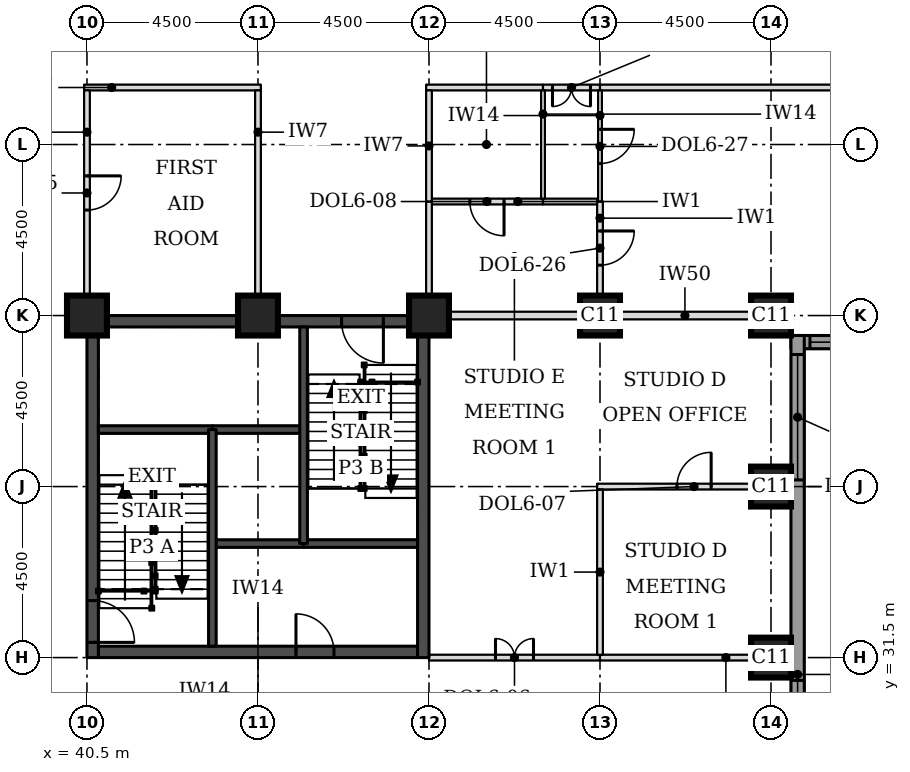
"""IFC4 building model, lengths in metres.
Left out: names, types, materials, properties, quantities, classifications, styles, units other than length and angle.
Written with IfcOpenShell. Run it as: python <this file> out.ifc"""

import sys

from ifc_helpers import new_model, si_unit, direction, frame, frame_2d, origin, origin_2d, place, context, subcontext, project, spatial, rectangle, extrude, element, fill, save


model = new_model("IFC4")
c1 = context("Model", 3, precision=1e-05, world=origin(), true_north=direction((0.0, 1.0)))
c2 = subcontext(c1, "Body", "Model", "MODEL_VIEW")
j1 = project(units=[si_unit("LENGTHUNIT", "METRE"), si_unit("PLANEANGLEUNIT", "RADIAN")], contexts=[c1])
p1 = place(None, origin())
s1 = spatial("IfcSite", under=j1, at=p1, CompositionType="ELEMENT")
p2 = place(p1, origin())
s2 = spatial("IfcBuilding", under=s1, at=p2, CompositionType="ELEMENT")
p3 = place(p2, frame((0.0, 0.0, 115.9)))
s3 = spatial("IfcBuildingStorey", under=s2, at=p3, CompositionType="ELEMENT", Elevation=115.9)
for number, where, z_axis, x_axis in (
    (1, (58.5, 31.5, 0.0), (0.0, 0.0, 1.0), (1.0, 0.0, 0.0)),
    (2, (58.5, 36.0, 0.0), (0.0, 0.0, 1.0), (1.0, 0.0, 0.0)),
    (3, (40.5, 40.5, 0.0), (0.0, 0.0, 1.0), (1.0, 0.0, 0.0)),
    (4, (45.0, 40.5, 0.0), (0.0, 0.0, 1.0), (1.0, 0.0, 0.0)),
    (5, (49.5, 40.5, 0.0), (0.0, 0.0, 1.0), (1.0, 0.0, 0.0)),
    (6, (54.0, 40.5, 0.0), (0.0, 0.0, 1.0), (1.0, 0.0, 0.0)),
    (7, (58.5, 40.5, 0.0), (0.0, 0.0, 1.0), (1.0, 0.0, 0.0)),
):
    element("IfcColumn", number, at=place(p3, frame(where, z_axis=z_axis, x_axis=x_axis)), inside=s3, PredefinedType="COLUMN", context=c2, shape_type="SweptSolid", body=[
        extrude(rectangle(XDim=1.05, YDim=1.05, at=origin_2d()), origin(), (0.0, 0.0, 1.0), 3.7),
    ])
p4 = place(p3, frame((40.8, 31.65, 0.0), z_axis=(0.0, 0.0, 1.0), x_axis=(1.0, 0.0, 0.0)))
e8 = element("IfcWall", 8, at=p4, inside=s3, PredefinedType="SHEAR", context=c2, shape_type="SweptSolid", body=[
    extrude(rectangle(XDim=8.4, YDim=0.3, at=frame_2d((4.2, 0.0))), origin(), (0.0, 0.0, 1.0), 3.7),
])
p5 = place(p4, frame((5.2, 0.0, 0.0)))
e9 = element("IfcOpeningElement", 9, at=p5, cuts=e8, PredefinedType="OPENING", context=c2, shape_type="SweptSolid", body=[
    extrude(rectangle(XDim=1.0, YDim=2.1, at=frame_2d((0.5, 1.05))), frame((0.0, 0.16, 0.0), z_axis=(0.0, -1.0, 0.0), x_axis=(1.0, 0.0, 0.0)), (0.0, 0.0, 1.0), 0.32),
])
p6 = place(p3, frame((40.8, 40.35, 0.0), z_axis=(0.0, 0.0, 1.0), x_axis=(1.0, 0.0, 0.0)))
e10 = element("IfcWall", 10, at=p6, inside=s3, PredefinedType="SHEAR", context=c2, shape_type="SweptSolid", body=[
    extrude(rectangle(XDim=8.4, YDim=0.3, at=frame_2d((4.2, 0.0))), origin(), (0.0, 0.0, 1.0), 3.7),
])
p7 = place(p6, frame((6.4, 0.0, 0.0)))
e11 = element("IfcOpeningElement", 11, at=p7, cuts=e10, PredefinedType="OPENING", context=c2, shape_type="SweptSolid", body=[
    extrude(rectangle(XDim=1.1, YDim=2.1, at=frame_2d((0.55, 1.05))), frame((0.0, 0.16, 0.0), z_axis=(0.0, -1.0, 0.0), x_axis=(1.0, 0.0, 0.0)), (0.0, 0.0, 1.0), 0.32),
])
p8 = place(p3, frame((40.65, 31.5, 0.0), z_axis=(0.0, 0.0, 1.0), x_axis=(0.0, 1.0, 0.0)))
e12 = element("IfcWall", 12, at=p8, inside=s3, PredefinedType="SHEAR", context=c2, shape_type="SweptSolid", body=[
    extrude(rectangle(XDim=9.0, YDim=0.3, at=frame_2d((4.5, 0.0))), origin(), (0.0, 0.0, 1.0), 3.7),
])
p9 = place(p8, frame((0.4, 0.0, 0.0)))
e13 = element("IfcOpeningElement", 13, at=p9, cuts=e12, PredefinedType="OPENING", context=c2, shape_type="SweptSolid", body=[
    extrude(rectangle(XDim=1.1, YDim=2.1, at=frame_2d((0.55, 1.05))), frame((0.0, 0.16, 0.0), z_axis=(0.0, -1.0, 0.0), x_axis=(1.0, 0.0, 0.0)), (0.0, 0.0, 1.0), 0.32),
])
p10 = place(p3, frame((49.35, 31.5, 0.0), z_axis=(0.0, 0.0, 1.0), x_axis=(0.0, 1.0, 0.0)))
e14 = element("IfcWall", 14, at=p10, inside=s3, PredefinedType="SHEAR", context=c2, shape_type="SweptSolid", body=[
    extrude(rectangle(XDim=9.0, YDim=0.3, at=frame_2d((4.5, 0.0))), origin(), (0.0, 0.0, 1.0), 3.7),
])
p11 = place(p3, frame((59.025, 39.8, 0.0), z_axis=(0.0, 0.0, 1.0), x_axis=(1.0, 0.0, 0.0)))
e15 = element("IfcWall", 15, at=p11, inside=s3, PredefinedType="STANDARD", context=c2, shape_type="SweptSolid", body=[
    extrude(rectangle(XDim=13.337, YDim=0.35, at=frame_2d((6.669, 0.0))), origin(), (0.0, 0.0, 1.0), 3.525),
])
p12 = place(p11, frame((0.5, 0.0, 0.9)))
e16 = element("IfcOpeningElement", 16, at=p12, cuts=e15, PredefinedType="OPENING", context=c2, shape_type="SweptSolid", body=[
    extrude(rectangle(XDim=3.3, YDim=1.9, at=frame_2d((1.65, 0.95))), frame((0.0, 0.185, 0.0), z_axis=(0.0, -1.0, 0.0), x_axis=(1.0, 0.0, 0.0)), (0.0, 0.0, 1.0), 0.37),
])
p13 = place(p3, frame((59.2, 22.138, 0.0), z_axis=(0.0, 0.0, 1.0), x_axis=(0.0, 1.0, 0.0)))
e17 = element("IfcWall", 17, at=p13, inside=s3, PredefinedType="STANDARD", context=c2, shape_type="SweptSolid", body=[
    extrude(rectangle(XDim=17.837, YDim=0.35, at=frame_2d((8.919, 0.0))), origin(), (0.0, 0.0, 1.0), 3.525),
])
p14 = place(p13, frame((5.462, 0.0, 0.9)))
e18 = element("IfcOpeningElement", 18, at=p14, cuts=e17, PredefinedType="OPENING", context=c2, shape_type="SweptSolid", body=[
    extrude(rectangle(XDim=3.3, YDim=1.9, at=frame_2d((1.65, 0.95))), frame((0.0, 0.185, 0.0), z_axis=(0.0, -1.0, 0.0), x_axis=(1.0, 0.0, 0.0)), (0.0, 0.0, 1.0), 0.37),
])
p15 = place(p13, frame((14.037, 0.0, 0.9)))
e19 = element("IfcOpeningElement", 19, at=p15, cuts=e17, PredefinedType="OPENING", context=c2, shape_type="SweptSolid", body=[
    extrude(rectangle(XDim=3.3, YDim=1.9, at=frame_2d((1.65, 0.95))), frame((0.0, 0.185, 0.0), z_axis=(0.0, -1.0, 0.0), x_axis=(1.0, 0.0, 0.0)), (0.0, 0.0, 1.0), 0.37),
])
p16 = place(p3, frame((49.5, 31.5, 0.0), z_axis=(0.0, 0.0, 1.0), x_axis=(1.0, 0.0, 0.0)))
e20 = element("IfcWall", 20, at=p16, inside=s3, PredefinedType="PARTITIONING", context=c2, shape_type="SweptSolid", body=[
    extrude(rectangle(XDim=4.5, YDim=0.15, at=frame_2d((2.25, 0.0))), origin(), (0.0, 0.0, 1.0), 2.55),
])
p17 = place(p16, frame((1.75, 0.0, 0.0)))
e21 = element("IfcOpeningElement", 21, at=p17, cuts=e20, PredefinedType="OPENING", context=c2, shape_type="SweptSolid", body=[
    extrude(rectangle(XDim=1.0, YDim=2.1, at=frame_2d((0.5, 1.05))), frame((0.0, 0.085, 0.0), z_axis=(0.0, -1.0, 0.0), x_axis=(1.0, 0.0, 0.0)), (0.0, 0.0, 1.0), 0.17),
])
p18 = place(p3, frame((54.0, 31.5, 0.0), z_axis=(0.0, 0.0, 1.0), x_axis=(1.0, 0.0, 0.0)))
e22 = element("IfcWall", 22, at=p18, inside=s3, PredefinedType="PARTITIONING", context=c2, shape_type="SweptSolid", body=[
    extrude(rectangle(XDim=5.025, YDim=0.15, at=frame_2d((2.512, 0.0))), origin(), (0.0, 0.0, 1.0), 2.55),
])
p19 = place(p3, frame((53.925, 36.0, 0.0), z_axis=(0.0, 0.0, 1.0), x_axis=(1.0, 0.0, 0.0)))
e23 = element("IfcWall", 23, at=p19, inside=s3, PredefinedType="PARTITIONING", context=c2, shape_type="SweptSolid", body=[
    extrude(rectangle(XDim=5.1, YDim=0.15, at=frame_2d((2.55, 0.0))), origin(), (0.0, 0.0, 1.0), 3.096),
])
p20 = place(p19, frame((2.1, 0.0, 0.0)))
e24 = element("IfcOpeningElement", 24, at=p20, cuts=e23, PredefinedType="OPENING", context=c2, shape_type="SweptSolid", body=[
    extrude(rectangle(XDim=0.9, YDim=2.1, at=frame_2d((0.45, 1.05))), frame((0.0, 0.085, 0.0), z_axis=(0.0, -1.0, 0.0), x_axis=(1.0, 0.0, 0.0)), (0.0, 0.0, 1.0), 0.17),
])
p21 = place(p3, frame((50.015, 40.5, 0.0), z_axis=(0.0, 0.0, 1.0), x_axis=(1.0, 0.0, 0.0)))
e25 = element("IfcWall", 25, at=p21, inside=s3, PredefinedType="PARTITIONING", context=c2, shape_type="SweptSolid", body=[
    extrude(rectangle(XDim=3.46, YDim=0.2, at=frame_2d((1.73, 0.0))), origin(), (0.0, 0.0, 1.0), 2.8),
])
p22 = place(p3, frame((54.495, 40.5, 0.0), z_axis=(0.0, 0.0, 1.0), x_axis=(1.0, 0.0, 0.0)))
e26 = element("IfcWall", 26, at=p22, inside=s3, PredefinedType="PARTITIONING", context=c2, shape_type="SweptSolid", body=[
    extrude(rectangle(XDim=3.48, YDim=0.2, at=frame_2d((1.74, 0.0))), origin(), (0.0, 0.0, 1.0), 2.8),
])
p23 = place(p3, frame((49.575, 43.5, 0.0), z_axis=(0.0, 0.0, 1.0), x_axis=(1.0, 0.0, 0.0)))
e27 = element("IfcWall", 27, at=p23, inside=s3, PredefinedType="PARTITIONING", context=c2, shape_type="SweptSolid", body=[
    extrude(rectangle(XDim=2.925, YDim=0.15, at=frame_2d((1.462, 0.0))), origin(), (0.0, 0.0, 1.0), 3.55),
])
p24 = place(p23, frame((1.0, 0.0, 0.0)))
e28 = element("IfcOpeningElement", 28, at=p24, cuts=e27, PredefinedType="OPENING", context=c2, shape_type="SweptSolid", body=[
    extrude(rectangle(XDim=0.9, YDim=2.1, at=frame_2d((0.45, 1.05))), frame((0.0, 0.085, 0.0), z_axis=(0.0, -1.0, 0.0), x_axis=(1.0, 0.0, 0.0)), (0.0, 0.0, 1.0), 0.17),
])
p25 = place(p3, frame((52.5, 43.5, 0.0), z_axis=(0.0, 0.0, 1.0), x_axis=(1.0, 0.0, 0.0)))
e29 = element("IfcWall", 29, at=p25, inside=s3, PredefinedType="PARTITIONING", context=c2, shape_type="SweptSolid", body=[
    extrude(rectangle(XDim=1.425, YDim=0.15, at=frame_2d((0.712, 0.0))), origin(), (0.0, 0.0, 1.0), 3.55),
])
p26 = place(p3, frame((40.425, 46.5, 0.0), z_axis=(0.0, 0.0, 1.0), x_axis=(1.0, 0.0, 0.0)))
e30 = element("IfcWall", 30, at=p26, inside=s3, PredefinedType="PARTITIONING", context=c2, shape_type="SweptSolid", body=[
    extrude(rectangle(XDim=4.65, YDim=0.15, at=frame_2d((2.325, 0.0))), origin(), (0.0, 0.0, 1.0), 3.55),
])
p27 = place(p3, frame((49.425, 46.5, 0.0), z_axis=(0.0, 0.0, 1.0), x_axis=(1.0, 0.0, 0.0)))
e31 = element("IfcWall", 31, at=p27, inside=s3, PredefinedType="PARTITIONING", context=c2, shape_type="SweptSolid", body=[
    extrude(rectangle(XDim=3.075, YDim=0.15, at=frame_2d((1.538, 0.0))), origin(), (0.0, 0.0, 1.0), 3.55),
])
p28 = place(p3, frame((52.5, 46.5, 0.0), z_axis=(0.0, 0.0, 1.0), x_axis=(1.0, 0.0, 0.0)))
e32 = element("IfcWall", 32, at=p28, inside=s3, PredefinedType="PARTITIONING", context=c2, shape_type="SweptSolid", body=[
    extrude(rectangle(XDim=1.5, YDim=0.15, at=frame_2d((0.75, 0.0))), origin(), (0.0, 0.0, 1.0), 3.55),
])
p29 = place(p28, frame((0.25, 0.0, 0.0)))
e33 = element("IfcOpeningElement", 33, at=p29, cuts=e32, PredefinedType="OPENING", context=c2, shape_type="SweptSolid", body=[
    extrude(rectangle(XDim=1.0, YDim=2.1, at=frame_2d((0.5, 1.05))), frame((0.0, 0.085, 0.0), z_axis=(0.0, -1.0, 0.0), x_axis=(1.0, 0.0, 0.0)), (0.0, 0.0, 1.0), 0.17),
])
p30 = place(p3, frame((54.0, 46.5, 0.0), z_axis=(0.0, 0.0, 1.0), x_axis=(1.0, 0.0, 0.0)))
e34 = element("IfcWall", 34, at=p30, inside=s3, PredefinedType="PARTITIONING", context=c2, shape_type="SweptSolid", body=[
    extrude(rectangle(XDim=16.5, YDim=0.15, at=frame_2d((8.25, 0.0))), origin(), (0.0, 0.0, 1.0), 3.55),
])
p31 = place(p3, frame((54.0, 31.575, 0.0), z_axis=(0.0, 0.0, 1.0), x_axis=(0.0, 1.0, 0.0)))
e35 = element("IfcWall", 35, at=p31, inside=s3, PredefinedType="PARTITIONING", context=c2, shape_type="SweptSolid", body=[
    extrude(rectangle(XDim=4.35, YDim=0.15, at=frame_2d((2.175, 0.0))), origin(), (0.0, 0.0, 1.0), 3.55),
])
p32 = place(p3, frame((40.5, 41.025, 0.0), z_axis=(0.0, 0.0, 1.0), x_axis=(0.0, 1.0, 0.0)))
e36 = element("IfcWall", 36, at=p32, inside=s3, PredefinedType="PARTITIONING", context=c2, shape_type="SweptSolid", body=[
    extrude(rectangle(XDim=5.4, YDim=0.15, at=frame_2d((2.7, 0.0))), origin(), (0.0, 0.0, 1.0), 3.55),
])
p33 = place(p32, frame((2.25, 0.0, 0.0)))
e37 = element("IfcOpeningElement", 37, at=p33, cuts=e36, PredefinedType="OPENING", context=c2, shape_type="SweptSolid", body=[
    extrude(rectangle(XDim=0.9, YDim=2.1, at=frame_2d((0.45, 1.05))), frame((0.0, 0.085, 0.0), z_axis=(0.0, -1.0, 0.0), x_axis=(1.0, 0.0, 0.0)), (0.0, 0.0, 1.0), 0.17),
])
p34 = place(p3, frame((45.0, 41.025, 0.0), z_axis=(0.0, 0.0, 1.0), x_axis=(0.0, 1.0, 0.0)))
e38 = element("IfcWall", 38, at=p34, inside=s3, PredefinedType="PARTITIONING", context=c2, shape_type="SweptSolid", body=[
    extrude(rectangle(XDim=5.4, YDim=0.15, at=frame_2d((2.7, 0.0))), origin(), (0.0, 0.0, 1.0), 3.55),
])
p35 = place(p3, frame((49.5, 41.025, 0.0), z_axis=(0.0, 0.0, 1.0), x_axis=(0.0, 1.0, 0.0)))
e39 = element("IfcWall", 39, at=p35, inside=s3, PredefinedType="PARTITIONING", context=c2, shape_type="SweptSolid", body=[
    extrude(rectangle(XDim=2.475, YDim=0.15, at=frame_2d((1.238, 0.0))), origin(), (0.0, 0.0, 1.0), 3.55),
])
p36 = place(p3, frame((54.0, 41.025, 0.0), z_axis=(0.0, 0.0, 1.0), x_axis=(0.0, 1.0, 0.0)))
e40 = element("IfcWall", 40, at=p36, inside=s3, PredefinedType="PARTITIONING", context=c2, shape_type="SweptSolid", body=[
    extrude(rectangle(XDim=2.475, YDim=0.15, at=frame_2d((1.238, 0.0))), origin(), (0.0, 0.0, 1.0), 3.55),
])
p37 = place(p36, frame((0.8, 0.0, 0.0)))
e41 = element("IfcOpeningElement", 41, at=p37, cuts=e40, PredefinedType="OPENING", context=c2, shape_type="SweptSolid", body=[
    extrude(rectangle(XDim=0.9, YDim=2.1, at=frame_2d((0.45, 1.05))), frame((0.0, 0.085, 0.0), z_axis=(0.0, -1.0, 0.0), x_axis=(1.0, 0.0, 0.0)), (0.0, 0.0, 1.0), 0.17),
])
p38 = place(p3, frame((49.5, 43.5, 0.0), z_axis=(0.0, 0.0, 1.0), x_axis=(0.0, 1.0, 0.0)))
e42 = element("IfcWall", 42, at=p38, inside=s3, PredefinedType="PARTITIONING", context=c2, shape_type="SweptSolid", body=[
    extrude(rectangle(XDim=2.925, YDim=0.15, at=frame_2d((1.462, 0.0))), origin(), (0.0, 0.0, 1.0), 3.55),
])
p39 = place(p3, frame((54.0, 43.5, 0.0), z_axis=(0.0, 0.0, 1.0), x_axis=(0.0, 1.0, 0.0)))
e43 = element("IfcWall", 43, at=p39, inside=s3, PredefinedType="PARTITIONING", context=c2, shape_type="SweptSolid", body=[
    extrude(rectangle(XDim=2.925, YDim=0.1, at=frame_2d((1.462, 0.0))), origin(), (0.0, 0.0, 1.0), 3.55),
])
p40 = place(p39, frame((1.0, 0.0, 0.0)))
e44 = element("IfcOpeningElement", 44, at=p40, cuts=e43, PredefinedType="OPENING", context=c2, shape_type="SweptSolid", body=[
    extrude(rectangle(XDim=0.9, YDim=2.1, at=frame_2d((0.45, 1.05))), frame((0.0, 0.06, 0.0), z_axis=(0.0, -1.0, 0.0), x_axis=(1.0, 0.0, 0.0)), (0.0, 0.0, 1.0), 0.12),
])
p41 = place(p3, frame((52.5, 43.575, 0.0), z_axis=(0.0, 0.0, 1.0), x_axis=(0.0, 1.0, 0.0)))
e45 = element("IfcWall", 45, at=p41, inside=s3, PredefinedType="PARTITIONING", context=c2, shape_type="SweptSolid", body=[
    extrude(rectangle(XDim=2.85, YDim=0.1, at=frame_2d((1.425, 0.0))), origin(), (0.0, 0.0, 1.0), 3.55),
])
p42 = place(p3, frame((43.8, 34.5, 0.0), z_axis=(0.0, 0.0, 1.0), x_axis=(1.0, 0.0, 0.0)))
e46 = element("IfcWall", 46, at=p42, inside=s3, PredefinedType="SOLIDWALL", context=c2, shape_type="SweptSolid", body=[
    extrude(rectangle(XDim=2.4, YDim=0.2, at=frame_2d((1.2, 0.0))), origin(), (0.0, 0.0, 1.0), 3.55),
])
p43 = place(p3, frame((46.2, 34.5, 0.0), z_axis=(0.0, 0.0, 1.0), x_axis=(1.0, 0.0, 0.0)))
e47 = element("IfcWall", 47, at=p43, inside=s3, PredefinedType="SOLIDWALL", context=c2, shape_type="SweptSolid", body=[
    extrude(rectangle(XDim=3.0, YDim=0.2, at=frame_2d((1.5, 0.0))), origin(), (0.0, 0.0, 1.0), 3.55),
])
p44 = place(p3, frame((43.8, 37.5, 0.0), z_axis=(0.0, 0.0, 1.0), x_axis=(1.0, 0.0, 0.0)))
e48 = element("IfcWall", 48, at=p44, inside=s3, PredefinedType="SOLIDWALL", context=c2, shape_type="SweptSolid", body=[
    extrude(rectangle(XDim=2.4, YDim=0.2, at=frame_2d((1.2, 0.0))), origin(), (0.0, 0.0, 1.0), 3.7),
])
p45 = place(p3, frame((40.8, 37.5, 0.0), z_axis=(0.0, 0.0, 1.0), x_axis=(1.0, 0.0, 0.0)))
e49 = element("IfcWall", 49, at=p45, inside=s3, PredefinedType="SOLIDWALL", context=c2, shape_type="SweptSolid", body=[
    extrude(rectangle(XDim=3.0, YDim=0.2, at=frame_2d((1.5, 0.0))), origin(), (0.0, 0.0, 1.0), 3.55),
])
for number, where, z_axis, x_axis in (
    (50, (43.8, 31.8, 0.0), (0.0, 0.0, 1.0), (0.0, 1.0, 0.0)),
    (51, (46.2, 34.5, 0.0), (0.0, 0.0, 1.0), (0.0, 1.0, 0.0)),
):
    element("IfcWall", number, at=place(p3, frame(where, z_axis=z_axis, x_axis=x_axis)), inside=s3, PredefinedType="SOLIDWALL", context=c2, shape_type="SweptSolid", body=[
        extrude(rectangle(XDim=5.7, YDim=0.2, at=frame_2d((2.85, 0.0))), origin(), (0.0, 0.0, 1.0), 3.55),
    ])
p46 = place(p12, origin())
e52 = element("IfcWindow", 52, at=p46, inside=s3, PartitioningType="SINGLE_PANEL", PredefinedType="WINDOW", context=c2, shape_type="SweptSolid", body=[
    extrude(rectangle(XDim=3.3, YDim=1.9, at=frame_2d((1.65, 0.95))), frame((0.0, 0.085, 0.0), z_axis=(0.0, -1.0, 0.0), x_axis=(1.0, 0.0, 0.0)), (0.0, 0.0, 1.0), 0.06),
])
fill(e16, e52)
p47 = place(p14, origin())
e53 = element("IfcWindow", 53, at=p47, inside=s3, PartitioningType="SINGLE_PANEL", PredefinedType="WINDOW", context=c2, shape_type="SweptSolid", body=[
    extrude(rectangle(XDim=3.3, YDim=1.9, at=frame_2d((1.65, 0.95))), frame((0.0, 0.085, 0.0), z_axis=(0.0, -1.0, 0.0), x_axis=(1.0, 0.0, 0.0)), (0.0, 0.0, 1.0), 0.06),
])
fill(e18, e53)
p48 = place(p15, origin())
e54 = element("IfcWindow", 54, at=p48, inside=s3, PartitioningType="SINGLE_PANEL", PredefinedType="WINDOW", context=c2, shape_type="SweptSolid", body=[
    extrude(rectangle(XDim=3.3, YDim=1.9, at=frame_2d((1.65, 0.95))), frame((0.0, 0.085, 0.0), z_axis=(0.0, -1.0, 0.0), x_axis=(1.0, 0.0, 0.0)), (0.0, 0.0, 1.0), 0.06),
])
fill(e19, e54)
p49 = place(p33, frame((0.9, 0.0, 0.0), z_axis=(0.0, 0.0, 1.0), x_axis=(-1.0, 0.0, 0.0)))
e55 = element("IfcDoor", 55, at=p49, inside=s3, OperationType="SINGLE_SWING_LEFT", PredefinedType="DOOR", context=c2, shape_type="SweptSolid", body=[
    extrude(rectangle(XDim=0.9, YDim=2.1, at=frame_2d((0.45, 1.05))), frame((0.0, 0.025, 0.0), z_axis=(0.0, -1.0, 0.0), x_axis=(1.0, 0.0, 0.0)), (0.0, 0.0, 1.0), 0.05),
])
fill(e37, e55)
p50 = place(p17, origin())
e56 = element("IfcDoor", 56, at=p50, inside=s3, OperationType="DOUBLE_DOOR_SINGLE_SWING", PredefinedType="DOOR", context=c2, shape_type="SweptSolid", body=[
    extrude(rectangle(XDim=1.0, YDim=2.1, at=frame_2d((0.5, 1.05))), frame((0.0, 0.025, 0.0), z_axis=(0.0, -1.0, 0.0), x_axis=(1.0, 0.0, 0.0)), (0.0, 0.0, 1.0), 0.05),
])
fill(e21, e56)
p51 = place(p20, origin())
e57 = element("IfcDoor", 57, at=p51, inside=s3, OperationType="SINGLE_SWING_RIGHT", PredefinedType="DOOR", context=c2, shape_type="SweptSolid", body=[
    extrude(rectangle(XDim=0.9, YDim=2.1, at=frame_2d((0.45, 1.05))), frame((0.0, 0.025, 0.0), z_axis=(0.0, -1.0, 0.0), x_axis=(1.0, 0.0, 0.0)), (0.0, 0.0, 1.0), 0.05),
])
fill(e24, e57)
p52 = place(p29, frame((1.0, 0.0, 0.0), z_axis=(0.0, 0.0, 1.0), x_axis=(-1.0, 0.0, 0.0)))
e58 = element("IfcDoor", 58, at=p52, inside=s3, OperationType="DOUBLE_DOOR_SINGLE_SWING", PredefinedType="DOOR", context=c2, shape_type="SweptSolid", body=[
    extrude(rectangle(XDim=1.0, YDim=2.1, at=frame_2d((0.5, 1.05))), frame((0.0, 0.025, 0.0), z_axis=(0.0, -1.0, 0.0), x_axis=(1.0, 0.0, 0.0)), (0.0, 0.0, 1.0), 0.05),
])
fill(e33, e58)
p53 = place(p40, frame((0.9, 0.0, 0.0), z_axis=(0.0, 0.0, 1.0), x_axis=(-1.0, 0.0, 0.0)))
e59 = element("IfcDoor", 59, at=p53, inside=s3, OperationType="SINGLE_SWING_LEFT", PredefinedType="DOOR", context=c2, shape_type="SweptSolid", body=[
    extrude(rectangle(XDim=0.9, YDim=2.1, at=frame_2d((0.45, 1.05))), frame((0.0, 0.025, 0.0), z_axis=(0.0, -1.0, 0.0), x_axis=(1.0, 0.0, 0.0)), (0.0, 0.0, 1.0), 0.05),
])
fill(e44, e59)
p54 = place(p37, frame((0.9, 0.0, 0.0), z_axis=(0.0, 0.0, 1.0), x_axis=(-1.0, 0.0, 0.0)))
e60 = element("IfcDoor", 60, at=p54, inside=s3, OperationType="SINGLE_SWING_LEFT", PredefinedType="DOOR", context=c2, shape_type="SweptSolid", body=[
    extrude(rectangle(XDim=0.9, YDim=2.1, at=frame_2d((0.45, 1.05))), frame((0.0, 0.025, 0.0), z_axis=(0.0, -1.0, 0.0), x_axis=(1.0, 0.0, 0.0)), (0.0, 0.0, 1.0), 0.05),
])
fill(e41, e60)
p55 = place(p24, frame((0.9, 0.0, 0.0), z_axis=(0.0, 0.0, 1.0), x_axis=(-1.0, 0.0, 0.0)))
e61 = element("IfcDoor", 61, at=p55, inside=s3, OperationType="SINGLE_SWING_LEFT", PredefinedType="DOOR", context=c2, shape_type="SweptSolid", body=[
    extrude(rectangle(XDim=0.9, YDim=2.1, at=frame_2d((0.45, 1.05))), frame((0.0, 0.025, 0.0), z_axis=(0.0, -1.0, 0.0), x_axis=(1.0, 0.0, 0.0)), (0.0, 0.0, 1.0), 0.05),
])
fill(e28, e61)
p56 = place(p9, frame((1.1, 0.0, 0.0), z_axis=(0.0, 0.0, 1.0), x_axis=(-1.0, 0.0, 0.0)))
e62 = element("IfcDoor", 62, at=p56, inside=s3, OperationType="SINGLE_SWING_RIGHT", PredefinedType="DOOR", context=c2, shape_type="SweptSolid", body=[
    extrude(rectangle(XDim=1.1, YDim=2.1, at=frame_2d((0.55, 1.05))), frame((0.0, 0.025, 0.0), z_axis=(0.0, -1.0, 0.0), x_axis=(1.0, 0.0, 0.0)), (0.0, 0.0, 1.0), 0.05),
])
fill(e13, e62)
p57 = place(p7, frame((1.1, 0.0, 0.0), z_axis=(0.0, 0.0, 1.0), x_axis=(-1.0, 0.0, 0.0)))
e63 = element("IfcDoor", 63, at=p57, inside=s3, OperationType="SINGLE_SWING_LEFT", PredefinedType="DOOR", context=c2, shape_type="SweptSolid", body=[
    extrude(rectangle(XDim=1.1, YDim=2.1, at=frame_2d((0.55, 1.05))), frame((0.0, 0.025, 0.0), z_axis=(0.0, -1.0, 0.0), x_axis=(1.0, 0.0, 0.0)), (0.0, 0.0, 1.0), 0.05),
])
fill(e11, e63)
p58 = place(p5, origin())
e64 = element("IfcDoor", 64, at=p58, inside=s3, OperationType="SINGLE_SWING_LEFT", PredefinedType="DOOR", context=c2, shape_type="SweptSolid", body=[
    extrude(rectangle(XDim=1.0, YDim=2.1, at=frame_2d((0.5, 1.05))), frame((0.0, 0.025, 0.0), z_axis=(0.0, -1.0, 0.0), x_axis=(1.0, 0.0, 0.0)), (0.0, 0.0, 1.0), 0.05),
])
fill(e9, e64)
save(model, sys.argv[1])
